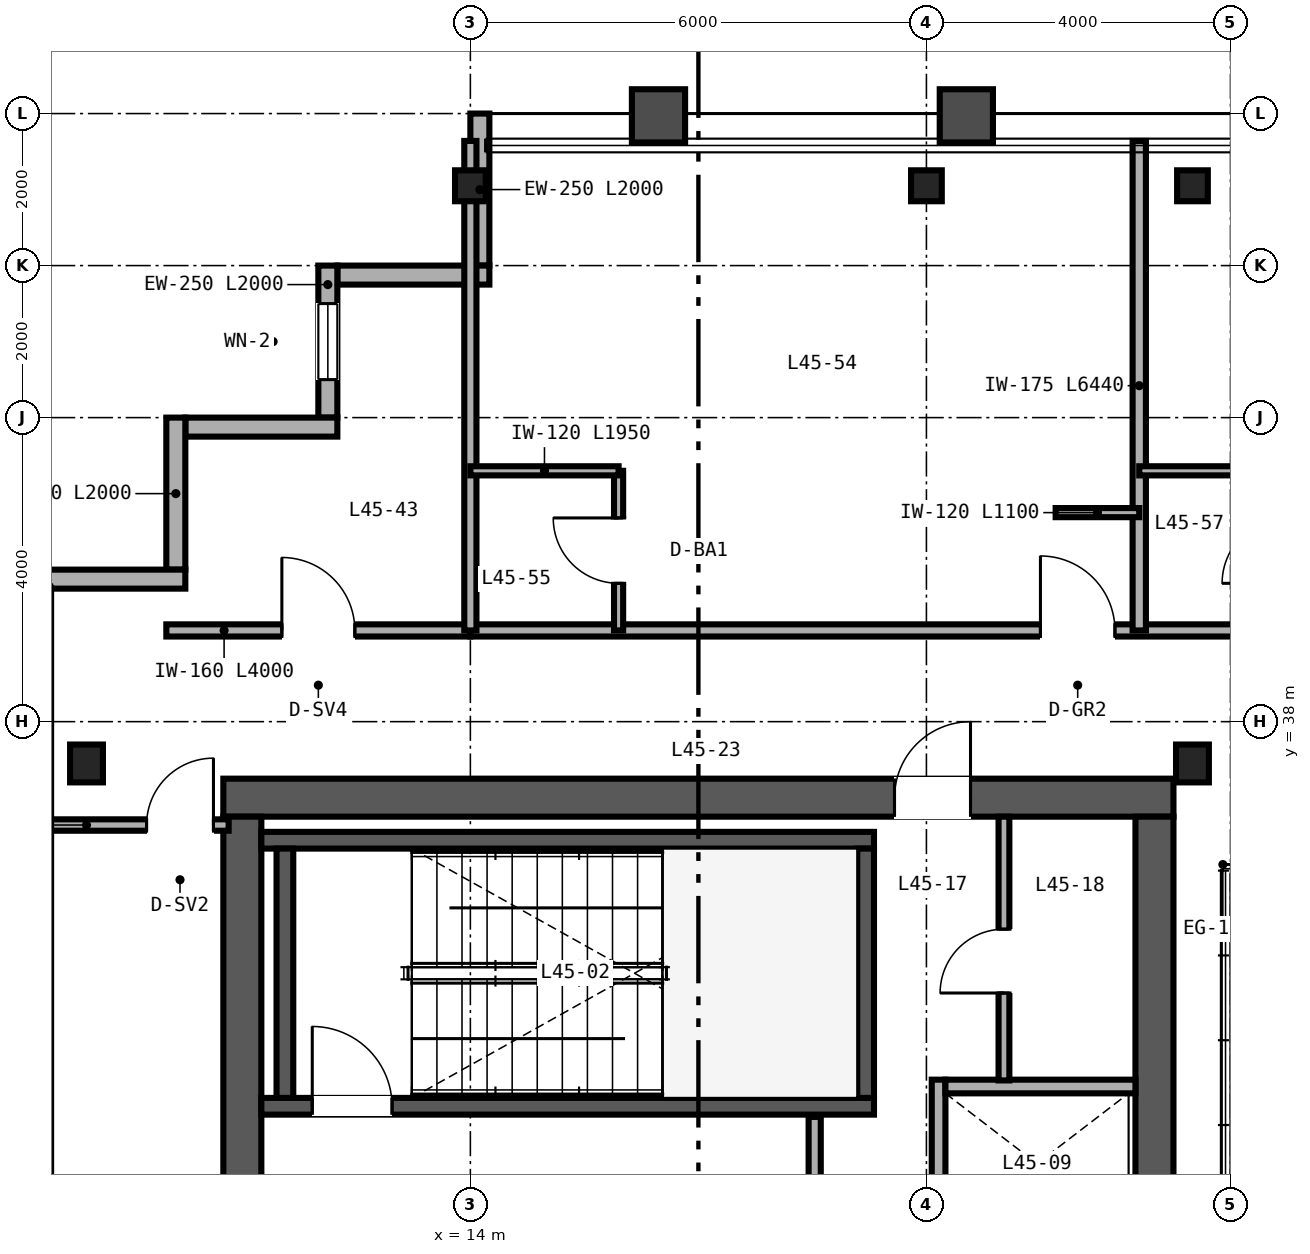
"""IFC4 building model, lengths in metres.
Left out: names, types, materials, properties, quantities, classifications, styles, units other than length and angle.
Written with IfcOpenShell. Run it as: python <this file> out.ifc"""

import sys

from ifc_helpers import new_model, si_unit, direction, frame, frame_2d, origin, origin_2d, place, context, subcontext, project, spatial, rectangle, i_section, extrude, source, transform, mapped, element, fill, save


model = new_model("IFC4")
c1 = context("Model", 3, precision=1e-05, world=origin(), true_north=direction((0.0, 1.0)))
c2 = subcontext(c1, "Body", "Model", "MODEL_VIEW")
j1 = project(units=[si_unit("LENGTHUNIT", "METRE"), si_unit("PLANEANGLEUNIT", "RADIAN")], contexts=[c1])
p1 = place(None, origin())
s1 = spatial("IfcSite", under=j1, at=p1, CompositionType="ELEMENT")
p2 = place(p1, origin())
s2 = spatial("IfcBuilding", under=s1, at=p2, CompositionType="ELEMENT")
p3 = place(p2, frame((0.0, 0.0, 181.2)))
s3 = spatial("IfcBuildingStorey", under=s2, at=p3, CompositionType="ELEMENT", Elevation=181.2)
p4 = place(p3, frame((10.75, 37.0, 0.0), z_axis=(0.0, 0.0, 1.0), x_axis=(1.0, 0.0, 0.0)))
e1 = element("IfcWall", 1, at=p4, inside=s3, PredefinedType="SHEAR", context=c2, shape_type="SweptSolid", body=[
    extrude(rectangle(XDim=12.5, YDim=0.5, at=frame_2d((6.25, 0.0))), origin(), (0.0, 0.0, 1.0), 3.37),
])
p5 = place(p4, frame((8.83, 0.0, 0.0)))
e2 = element("IfcOpeningElement", 2, at=p5, cuts=e1, PredefinedType="OPENING", context=c2, shape_type="SweptSolid", body=[
    extrude(rectangle(XDim=1.0, YDim=2.15, at=frame_2d((0.5, 1.075))), frame((0.0, 0.26, 0.0), z_axis=(0.0, -1.0, 0.0), x_axis=(1.0, 0.0, 0.0)), (0.0, 0.0, 1.0), 0.52),
])
for number, where, z_axis, x_axis in (
    (3, (11.0, 15.25, 0.0), (0.0, 0.0, 1.0), (0.0, 1.0, 0.0)),
    (4, (23.0, 15.25, 0.0), (0.0, 0.0, 1.0), (0.0, 1.0, 0.0)),
):
    element("IfcWall", number, at=place(p3, frame(where, z_axis=z_axis, x_axis=x_axis)), inside=s3, PredefinedType="SHEAR", context=c2, shape_type="SweptSolid", body=[
        extrude(rectangle(XDim=21.5, YDim=0.5, at=frame_2d((10.75, 0.0))), origin(), (0.0, 0.0, 1.0), 3.37),
    ])
p6 = place(p3, frame((11.25, 32.94, 0.0), z_axis=(0.0, 0.0, 1.0), x_axis=(1.0, 0.0, 0.0)))
e5 = element("IfcWall", 5, at=p6, inside=s3, PredefinedType="SHEAR", context=c2, shape_type="SweptSolid", body=[
    extrude(rectangle(XDim=8.06, YDim=0.22, at=frame_2d((4.03, 0.0))), origin(), (0.0, 0.0, 1.0), 3.4),
])
p7 = place(p6, frame((0.67, 0.0, 0.0)))
e6 = element("IfcOpeningElement", 6, at=p7, cuts=e5, PredefinedType="OPENING", context=c2, shape_type="SweptSolid", body=[
    extrude(rectangle(XDim=1.05, YDim=2.15, at=frame_2d((0.525, 1.075))), frame((0.0, 0.12, 0.0), z_axis=(0.0, -1.0, 0.0), x_axis=(1.0, 0.0, 0.0)), (0.0, 0.0, 1.0), 0.24),
])
p8 = place(p3, frame((11.25, 36.44, 0.0), z_axis=(0.0, 0.0, 1.0), x_axis=(1.0, 0.0, 0.0)))
e7 = element("IfcWall", 7, at=p8, inside=s3, PredefinedType="SHEAR", context=c2, shape_type="SweptSolid", body=[
    extrude(rectangle(XDim=8.06, YDim=0.22, at=frame_2d((4.03, 0.0))), origin(), (0.0, 0.0, 1.0), 3.4),
])
for number, where, z_axis, x_axis in (
    (8, (11.56, 33.05, 0.0), (0.0, 0.0, 1.0), (0.0, 1.0, 0.0)),
    (9, (19.2, 33.05, 0.0), (0.0, 0.0, 1.0), (0.0, 1.0, 0.0)),
):
    element("IfcWall", number, at=place(p3, frame(where, z_axis=z_axis, x_axis=x_axis)), inside=s3, PredefinedType="SHEAR", context=c2, shape_type="SweptSolid", body=[
        extrude(rectangle(XDim=3.28, YDim=0.22, at=frame_2d((1.64, 0.0))), origin(), (0.0, 0.0, 1.0), 3.4),
    ])
m1 = source(origin(), c2, "Body", "SweptSolid", [
    extrude(i_section(OverallWidth=0.432, OverallDepth=0.498, WebThickness=0.056, FlangeThickness=0.089, FilletRadius=0.025, at=origin_2d()), origin(), (0.0, 0.0, 1.0), 3.37),
])
for number, where, z_axis, x_axis in (
    (10, (8.95, 37.45, 0.0), (0.0, 0.0, 1.0), (1.0, 0.0, 0.0)),
    (11, (23.5, 37.45, 0.0), (0.0, 0.0, 1.0), (1.0, 0.0, 0.0)),
):
    element("IfcColumn", number, at=place(p3, frame(where, z_axis=z_axis, x_axis=x_axis)), inside=s3, PredefinedType="COLUMN", context=c2, shape_type="MappedRepresentation", body=[
        mapped(m1, transform((0.0, 0.0, 0.0), scale=1.0)),
    ])
m2 = source(origin(), c2, "Body", "SweptSolid", [
    extrude(i_section(OverallWidth=0.404, OverallDepth=0.407, WebThickness=0.027, FlangeThickness=0.044, FilletRadius=0.025, at=origin_2d()), origin(), (0.0, 0.0, 1.0), 3.37),
])
for number, where, z_axis, x_axis in (
    (12, (14.0, 45.05, 0.0), (0.0, 0.0, 1.0), (1.0, 0.0, 0.0)),
    (13, (20.0, 45.05, 0.0), (0.0, 0.0, 1.0), (1.0, 0.0, 0.0)),
    (14, (23.5, 45.05, 0.0), (0.0, 0.0, 1.0), (1.0, 0.0, 0.0)),
):
    element("IfcColumn", number, at=place(p3, frame(where, z_axis=z_axis, x_axis=x_axis)), inside=s3, PredefinedType="COLUMN", context=c2, shape_type="MappedRepresentation", body=[
        mapped(m2, transform((0.0, 0.0, 0.0), scale=1.0)),
    ])
p9 = place(p3, frame((14.125, 46.0, 0.0), z_axis=(0.0, 0.0, 1.0), x_axis=(0.0, -1.0, 0.0)))
e15 = element("IfcWall", 15, at=p9, inside=s3, PredefinedType="SOLIDWALL", context=c2, shape_type="SweptSolid", body=[
    extrude(rectangle(XDim=2.0, YDim=0.25, at=frame_2d((1.0, 0.0))), origin(), (0.0, 0.0, 1.0), 2.677),
])
p10 = place(p3, frame((14.25, 43.875, 0.0), z_axis=(0.0, 0.0, 1.0), x_axis=(-1.0, 0.0, 0.0)))
e16 = element("IfcWall", 16, at=p10, inside=s3, PredefinedType="SOLIDWALL", context=c2, shape_type="SweptSolid", body=[
    extrude(rectangle(XDim=2.0, YDim=0.25, at=frame_2d((1.0, 0.0))), origin(), (0.0, 0.0, 1.0), 3.37),
])
p11 = place(p3, frame((12.125, 44.0, 0.0), z_axis=(0.0, 0.0, 1.0), x_axis=(0.0, -1.0, 0.0)))
e17 = element("IfcWall", 17, at=p11, inside=s3, PredefinedType="SOLIDWALL", context=c2, shape_type="SweptSolid", body=[
    extrude(rectangle(XDim=2.0, YDim=0.25, at=frame_2d((1.0, 0.0))), origin(), (0.0, 0.0, 1.0), 3.37),
])
p12 = place(p11, frame((0.5, 0.0, 0.85)))
e18 = element("IfcOpeningElement", 18, at=p12, cuts=e17, PredefinedType="OPENING", context=c2, shape_type="SweptSolid", body=[
    extrude(rectangle(XDim=1.0, YDim=1.9, at=frame_2d((0.5, 0.95))), frame((0.0, 0.135, 0.0), z_axis=(0.0, -1.0, 0.0), x_axis=(1.0, 0.0, 0.0)), (0.0, 0.0, 1.0), 0.27),
])
for number, where, z_axis, x_axis in (
    (19, (12.25, 41.875, 0.0), (0.0, 0.0, 1.0), (-1.0, 0.0, 0.0)),
    (20, (10.125, 42.0, 0.0), (0.0, 0.0, 1.0), (0.0, -1.0, 0.0)),
):
    element("IfcWall", number, at=place(p3, frame(where, z_axis=z_axis, x_axis=x_axis)), inside=s3, PredefinedType="SOLIDWALL", context=c2, shape_type="SweptSolid", body=[
        extrude(rectangle(XDim=2.0, YDim=0.25, at=frame_2d((1.0, 0.0))), origin(), (0.0, 0.0, 1.0), 3.37),
    ])
p13 = place(p3, frame((10.25, 39.875, 0.0), z_axis=(0.0, 0.0, 1.0), x_axis=(-1.0, 0.0, 0.0)))
e21 = element("IfcWall", 21, at=p13, inside=s3, PredefinedType="SOLIDWALL", context=c2, shape_type="SweptSolid", body=[
    extrude(rectangle(XDim=2.25, YDim=0.25, at=frame_2d((1.125, 0.0))), origin(), (0.0, 0.0, 1.0), 3.37),
])
p14 = place(p3, frame((20.16, 29.0, 0.0), z_axis=(0.0, 0.0, 1.0), x_axis=(0.0, 1.0, 0.0)))
e22 = element("IfcWall", 22, at=p14, inside=s3, PredefinedType="SOLIDWALL", context=c2, shape_type="SweptSolid", body=[
    extrude(rectangle(XDim=4.29, YDim=0.18, at=frame_2d((2.145, 0.0))), origin(), (0.0, 0.0, 1.0), 3.37),
])
p15 = place(p3, frame((20.25, 33.2, 0.0), z_axis=(0.0, 0.0, 1.0), x_axis=(1.0, 0.0, 0.0)))
e23 = element("IfcWall", 23, at=p15, inside=s3, PredefinedType="SOLIDWALL", context=c2, shape_type="SweptSolid", body=[
    extrude(rectangle(XDim=2.5, YDim=0.18, at=frame_2d((1.25, 0.0))), origin(), (0.0, 0.0, 1.0), 3.37),
])
p16 = place(p3, frame((18.53, 28.9, 0.0), z_axis=(0.0, 0.0, 1.0), x_axis=(0.0, 1.0, 0.0)))
e24 = element("IfcWall", 24, at=p16, inside=s3, PredefinedType="PARTITIONING", context=c2, shape_type="SweptSolid", body=[
    extrude(rectangle(XDim=3.9, YDim=0.16, at=frame_2d((1.95, 0.0))), origin(), (0.0, 0.0, 1.0), 3.37),
])
p17 = place(p16, frame((1.5, 0.0, 0.0)))
e25 = element("IfcOpeningElement", 25, at=p17, cuts=e24, PredefinedType="OPENING", context=c2, shape_type="SweptSolid", body=[
    extrude(rectangle(XDim=1.0, YDim=2.15, at=frame_2d((0.5, 1.075))), frame((0.0, 0.09, 0.0), z_axis=(0.0, -1.0, 0.0), x_axis=(1.0, 0.0, 0.0)), (0.0, 0.0, 1.0), 0.18),
])
p18 = place(p3, frame((21.02, 33.28, 0.0), z_axis=(0.0, 0.0, 1.0), x_axis=(0.0, 1.0, 0.0)))
e26 = element("IfcWall", 26, at=p18, inside=s3, PredefinedType="PARTITIONING", context=c2, shape_type="SweptSolid", body=[
    extrude(rectangle(XDim=3.47, YDim=0.142, at=frame_2d((1.735, 0.0))), origin(), (0.0, 0.0, 1.0), 3.37),
])
p19 = place(p18, frame((1.15, 0.0, 0.0)))
e27 = element("IfcOpeningElement", 27, at=p19, cuts=e26, PredefinedType="OPENING", context=c2, shape_type="SweptSolid", body=[
    extrude(rectangle(XDim=0.84, YDim=2.1, at=frame_2d((0.42, 1.05))), frame((0.0, 0.081, 0.0), z_axis=(0.0, -1.0, 0.0), x_axis=(1.0, 0.0, 0.0)), (0.0, 0.0, 1.0), 0.162),
])
p20 = place(p3, frame((8.16, 36.64, 0.0), z_axis=(0.0, 0.0, 1.0), x_axis=(1.0, 0.0, 0.0)))
e28 = element("IfcWall", 28, at=p20, inside=s3, PredefinedType="PARTITIONING", context=c2, shape_type="SweptSolid", body=[
    extrude(rectangle(XDim=2.66, YDim=0.15, at=frame_2d((1.33, 0.0))), origin(), (0.0, 0.0, 1.0), 2.753),
])
p21 = place(p20, frame((1.58, 0.0, 0.0)))
e29 = element("IfcOpeningElement", 29, at=p21, cuts=e28, PredefinedType="OPENING", context=c2, shape_type="SweptSolid", body=[
    extrude(rectangle(XDim=0.88, YDim=2.15, at=frame_2d((0.44, 1.075))), frame((0.0, 0.085, 0.0), z_axis=(0.0, -1.0, 0.0), x_axis=(1.0, 0.0, 0.0)), (0.0, 0.0, 1.0), 0.17),
])
p22 = place(p3, frame((10.0, 39.2, 0.0), z_axis=(0.0, 0.0, 1.0), x_axis=(1.0, 0.0, 0.0)))
e30 = element("IfcWall", 30, at=p22, inside=s3, PredefinedType="PARTITIONING", context=c2, shape_type="SweptSolid", body=[
    extrude(rectangle(XDim=4.0, YDim=0.16, at=frame_2d((2.0, 0.0))), origin(), (0.0, 0.0, 1.0), 3.37),
])
p23 = place(p22, frame((1.52, 0.0, 0.0)))
e31 = element("IfcOpeningElement", 31, at=p23, cuts=e30, PredefinedType="OPENING", context=c2, shape_type="SweptSolid", body=[
    extrude(rectangle(XDim=0.96, YDim=2.15, at=frame_2d((0.48, 1.075))), frame((0.0, 0.09, 0.0), z_axis=(0.0, -1.0, 0.0), x_axis=(1.0, 0.0, 0.0)), (0.0, 0.0, 1.0), 0.18),
])
p24 = place(p3, frame((14.0, 39.2, 0.0), z_axis=(0.0, 0.0, 1.0), x_axis=(1.0, 0.0, 0.0)))
e32 = element("IfcWall", 32, at=p24, inside=s3, PredefinedType="PARTITIONING", context=c2, shape_type="SweptSolid", body=[
    extrude(rectangle(XDim=36.0, YDim=0.16, at=frame_2d((18.0, 0.0))), origin(), (0.0, 0.0, 1.0), 2.913),
])
p25 = place(p24, frame((7.5, 0.0, 0.0)))
e33 = element("IfcOpeningElement", 33, at=p25, cuts=e32, PredefinedType="OPENING", context=c2, shape_type="SweptSolid", body=[
    extrude(rectangle(XDim=0.98, YDim=2.2, at=frame_2d((0.49, 1.1))), frame((0.0, 0.09, 0.0), z_axis=(0.0, -1.0, 0.0), x_axis=(1.0, 0.0, 0.0)), (0.0, 0.0, 1.0), 0.18),
])
p26 = place(p24, frame((16.5, 0.0, 0.0)))
e34 = element("IfcOpeningElement", 34, at=p26, cuts=e32, PredefinedType="OPENING", context=c2, shape_type="SweptSolid", body=[
    extrude(rectangle(XDim=0.98, YDim=2.2, at=frame_2d((0.49, 1.1))), frame((0.0, 0.09, 0.0), z_axis=(0.0, -1.0, 0.0), x_axis=(1.0, 0.0, 0.0)), (0.0, 0.0, 1.0), 0.18),
])
p27 = place(p24, frame((21.82, 0.0, 0.0)))
e35 = element("IfcOpeningElement", 35, at=p27, cuts=e32, PredefinedType="OPENING", context=c2, shape_type="SweptSolid", body=[
    extrude(rectangle(XDim=0.96, YDim=2.15, at=frame_2d((0.48, 1.075))), frame((0.0, 0.09, 0.0), z_axis=(0.0, -1.0, 0.0), x_axis=(1.0, 0.0, 0.0)), (0.0, 0.0, 1.0), 0.18),
])
p28 = place(p24, frame((30.14, 0.0, 0.0)))
e36 = element("IfcOpeningElement", 36, at=p28, cuts=e32, PredefinedType="OPENING", context=c2, shape_type="SweptSolid", body=[
    extrude(rectangle(XDim=0.94, YDim=2.15, at=frame_2d((0.47, 1.075))), frame((0.0, 0.09, 0.0), z_axis=(0.0, -1.0, 0.0), x_axis=(1.0, 0.0, 0.0)), (0.0, 0.0, 1.0), 0.18),
])
p29 = place(p24, frame((34.74, 0.0, 0.0)))
e37 = element("IfcOpeningElement", 37, at=p29, cuts=e32, PredefinedType="OPENING", context=c2, shape_type="SweptSolid", body=[
    extrude(rectangle(XDim=0.94, YDim=2.15, at=frame_2d((0.47, 1.075))), frame((0.0, 0.09, 0.0), z_axis=(0.0, -1.0, 0.0), x_axis=(1.0, 0.0, 0.0)), (0.0, 0.0, 1.0), 0.18),
])
p30 = place(p3, frame((14.0, 39.2, 0.0), z_axis=(0.0, 0.0, 1.0), x_axis=(0.0, 1.0, 0.0)))
e38 = element("IfcWall", 38, at=p30, inside=s3, PredefinedType="PARTITIONING", context=c2, shape_type="SweptSolid", body=[
    extrude(rectangle(XDim=6.44, YDim=0.16, at=frame_2d((3.22, 0.0))), origin(), (0.0, 0.0, 1.0), 2.677),
])
p31 = place(p3, frame((22.8, 39.2, 0.0), z_axis=(0.0, 0.0, 1.0), x_axis=(0.0, 1.0, 0.0)))
e39 = element("IfcWall", 39, at=p31, inside=s3, PredefinedType="PARTITIONING", context=c2, shape_type="SweptSolid", body=[
    extrude(rectangle(XDim=6.44, YDim=0.175, at=frame_2d((3.22, 0.0))), origin(), (0.0, 0.0, 1.0), 2.833),
])
p32 = place(p3, frame((15.95, 39.2, 0.0), z_axis=(0.0, 0.0, 1.0), x_axis=(0.0, 1.0, 0.0)))
e40 = element("IfcWall", 40, at=p32, inside=s3, PredefinedType="PARTITIONING", context=c2, shape_type="SweptSolid", body=[
    extrude(rectangle(XDim=2.1, YDim=0.12, at=frame_2d((1.05, 0.0))), origin(), (0.0, 0.0, 1.0), 3.37),
])
p33 = place(p32, frame((0.62, 0.0, 0.0)))
e41 = element("IfcOpeningElement", 41, at=p33, cuts=e40, PredefinedType="OPENING", context=c2, shape_type="SweptSolid", body=[
    extrude(rectangle(XDim=0.86, YDim=2.1, at=frame_2d((0.43, 1.05))), frame((0.0, 0.07, 0.0), z_axis=(0.0, -1.0, 0.0), x_axis=(1.0, 0.0, 0.0)), (0.0, 0.0, 1.0), 0.14),
])
p34 = place(p3, frame((14.0, 41.3, 0.0), z_axis=(0.0, 0.0, 1.0), x_axis=(1.0, 0.0, 0.0)))
e42 = element("IfcWall", 42, at=p34, inside=s3, PredefinedType="PARTITIONING", context=c2, shape_type="SweptSolid", body=[
    extrude(rectangle(XDim=1.95, YDim=0.12, at=frame_2d((0.975, 0.0))), origin(), (0.0, 0.0, 1.0), 3.37),
])
p35 = place(p3, frame((21.7, 40.75, 0.0), z_axis=(0.0, 0.0, 1.0), x_axis=(1.0, 0.0, 0.0)))
e43 = element("IfcWall", 43, at=p35, inside=s3, PredefinedType="PARTITIONING", context=c2, shape_type="SweptSolid", body=[
    extrude(rectangle(XDim=1.1, YDim=0.12, at=frame_2d((0.55, 0.0))), origin(), (0.0, 0.0, 1.0), 3.37),
])
p36 = place(p3, frame((22.8, 41.3, 0.0), z_axis=(0.0, 0.0, 1.0), x_axis=(1.0, 0.0, 0.0)))
e44 = element("IfcWall", 44, at=p36, inside=s3, PredefinedType="PARTITIONING", context=c2, shape_type="SweptSolid", body=[
    extrude(rectangle(XDim=1.95, YDim=0.12, at=frame_2d((0.975, 0.0))), origin(), (0.0, 0.0, 1.0), 2.913),
])
m3 = source(origin(), c2, "Body", "SweptSolid", [
    extrude(rectangle(XDim=1.0, YDim=1.9, at=frame_2d((0.5, 0.95))), frame((0.0, 0.03, 0.0), z_axis=(0.0, -1.0, 0.0), x_axis=(1.0, 0.0, 0.0)), (0.0, 0.0, 1.0), 0.06),
])
p37 = place(p12, origin())
e45 = element("IfcWindow", 45, at=p37, inside=s3, PartitioningType="SINGLE_PANEL", PredefinedType="WINDOW", context=c2, shape_type="MappedRepresentation", body=[
    mapped(m3, transform((0.0, 0.0, 0.0), scale=1.0)),
])
fill(e18, e45)
m4 = source(origin(), c2, "Body", "SweptSolid", [
    extrude(rectangle(XDim=1.05, YDim=2.15, at=frame_2d((0.525, 1.075))), frame((0.0, 0.025, 0.0), z_axis=(0.0, -1.0, 0.0), x_axis=(1.0, 0.0, 0.0)), (0.0, 0.0, 1.0), 0.05),
])
p38 = place(p7, origin())
e46 = element("IfcDoor", 46, at=p38, inside=s3, OperationType="SINGLE_SWING_LEFT", PredefinedType="DOOR", context=c2, shape_type="MappedRepresentation", body=[
    mapped(m4, transform((0.0, 0.0, 0.0), scale=1.0)),
])
fill(e6, e46)
m5 = source(origin(), c2, "Body", "SweptSolid", [
    extrude(rectangle(XDim=0.84, YDim=2.1, at=frame_2d((0.42, 1.05))), frame((0.0, 0.025, 0.0), z_axis=(0.0, -1.0, 0.0), x_axis=(1.0, 0.0, 0.0)), (0.0, 0.0, 1.0), 0.05),
])
p39 = place(p19, origin())
e47 = element("IfcDoor", 47, at=p39, inside=s3, OperationType="SINGLE_SWING_LEFT", PredefinedType="DOOR", context=c2, shape_type="MappedRepresentation", body=[
    mapped(m5, transform((0.0, 0.0, 0.0), scale=1.0)),
])
fill(e27, e47)
m6 = source(origin(), c2, "Body", "SweptSolid", [
    extrude(rectangle(XDim=1.0, YDim=2.15, at=frame_2d((0.5, 1.075))), frame((0.0, 0.025, 0.0), z_axis=(0.0, -1.0, 0.0), x_axis=(1.0, 0.0, 0.0)), (0.0, 0.0, 1.0), 0.05),
])
p40 = place(p5, origin())
e48 = element("IfcDoor", 48, at=p40, inside=s3, OperationType="SINGLE_SWING_RIGHT", PredefinedType="DOOR", context=c2, shape_type="MappedRepresentation", body=[
    mapped(m6, transform((0.0, 0.0, 0.0), scale=1.0)),
])
fill(e2, e48)
m7 = source(origin(), c2, "Body", "SweptSolid", [
    extrude(rectangle(XDim=0.88, YDim=2.15, at=frame_2d((0.44, 1.075))), frame((0.0, 0.025, 0.0), z_axis=(0.0, -1.0, 0.0), x_axis=(1.0, 0.0, 0.0)), (0.0, 0.0, 1.0), 0.05),
])
p41 = place(p21, origin())
e49 = element("IfcDoor", 49, at=p41, inside=s3, OperationType="SINGLE_SWING_RIGHT", PredefinedType="DOOR", context=c2, shape_type="MappedRepresentation", body=[
    mapped(m7, transform((0.0, 0.0, 0.0), scale=1.0)),
])
fill(e29, e49)
m8 = source(origin(), c2, "Body", "SweptSolid", [
    extrude(rectangle(XDim=0.96, YDim=2.15, at=frame_2d((0.48, 1.075))), frame((0.0, 0.025, 0.0), z_axis=(0.0, -1.0, 0.0), x_axis=(1.0, 0.0, 0.0)), (0.0, 0.0, 1.0), 0.05),
])
p42 = place(p23, origin())
e50 = element("IfcDoor", 50, at=p42, inside=s3, OperationType="SINGLE_SWING_LEFT", PredefinedType="DOOR", context=c2, shape_type="MappedRepresentation", body=[
    mapped(m8, transform((0.0, 0.0, 0.0), scale=1.0)),
])
fill(e31, e50)
m9 = source(origin(), c2, "Body", "SweptSolid", [
    extrude(rectangle(XDim=0.86, YDim=2.1, at=frame_2d((0.43, 1.05))), frame((0.0, 0.025, 0.0), z_axis=(0.0, -1.0, 0.0), x_axis=(1.0, 0.0, 0.0)), (0.0, 0.0, 1.0), 0.05),
])
p43 = place(p33, origin())
e51 = element("IfcDoor", 51, at=p43, inside=s3, OperationType="SINGLE_SWING_RIGHT", PredefinedType="DOOR", context=c2, shape_type="MappedRepresentation", body=[
    mapped(m9, transform((0.0, 0.0, 0.0), scale=1.0)),
])
fill(e41, e51)
m10 = source(origin(), c2, "Body", "SweptSolid", [
    extrude(rectangle(XDim=0.98, YDim=2.2, at=frame_2d((0.49, 1.1))), frame((0.0, 0.025, 0.0), z_axis=(0.0, -1.0, 0.0), x_axis=(1.0, 0.0, 0.0)), (0.0, 0.0, 1.0), 0.05),
])
p44 = place(p25, origin())
e52 = element("IfcDoor", 52, at=p44, inside=s3, OperationType="SINGLE_SWING_LEFT", PredefinedType="DOOR", context=c2, shape_type="MappedRepresentation", body=[
    mapped(m10, transform((0.0, 0.0, 0.0), scale=1.0)),
])
fill(e33, e52)
save(model, sys.argv[1])
